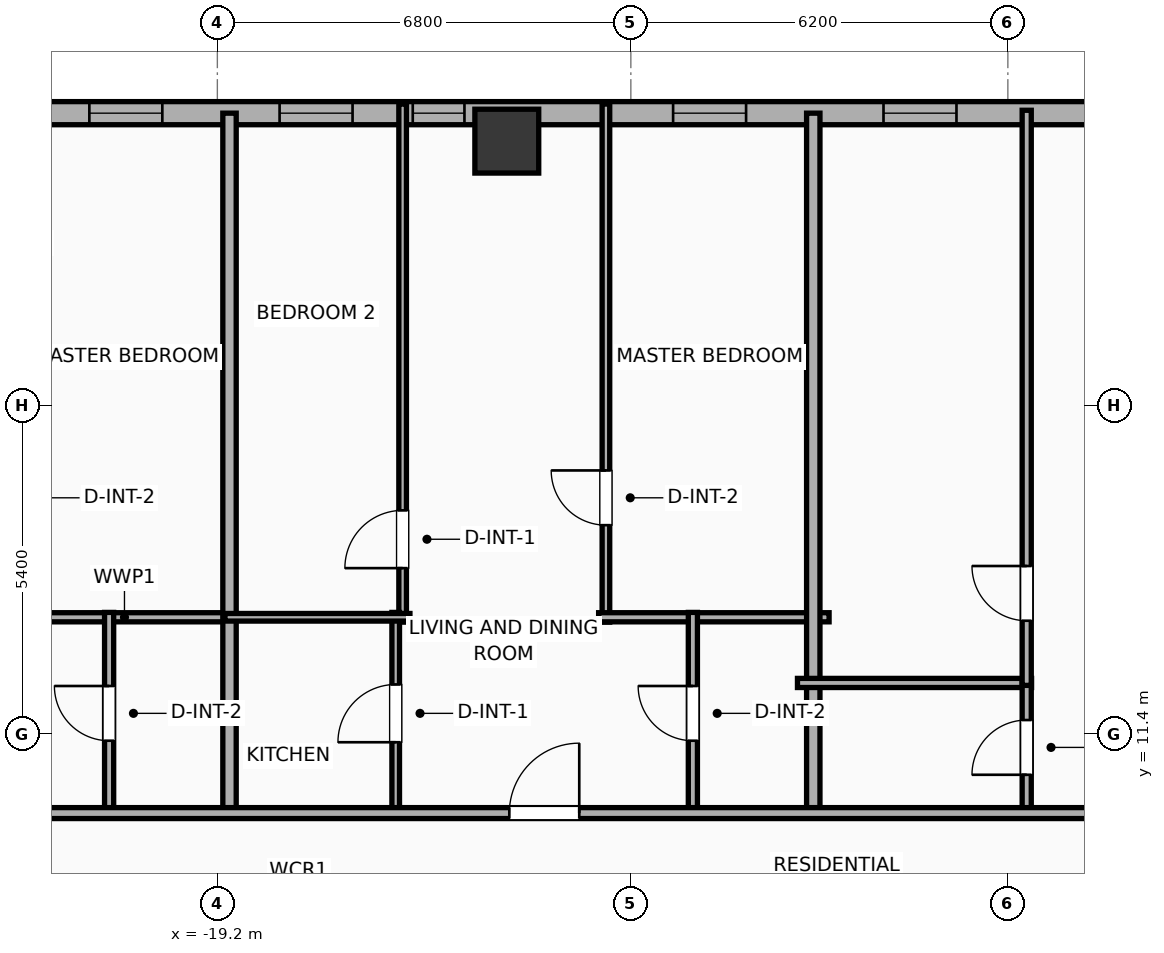
"""IFC4 building model, lengths in metres.
Left out: names, types, materials, properties, quantities, classifications, styles, units other than length and angle.
Written with IfcOpenShell. Run it as: python <this file> out.ifc"""

import sys

from ifc_helpers import new_model, si_unit, direction, frame, frame_2d, origin, origin_2d, place, context, subcontext, project, spatial, rectangle, hollow_rectangle, extrude, element, fill, save


model = new_model("IFC4")
c1 = context("Model", 3, precision=1e-05, world=origin(), true_north=direction((0.0, 1.0)))
c2 = subcontext(c1, "Body", "Model", "MODEL_VIEW")
j1 = project(units=[si_unit("LENGTHUNIT", "METRE"), si_unit("PLANEANGLEUNIT", "RADIAN")], contexts=[c1])
p1 = place(None, origin())
s1 = spatial("IfcSite", under=j1, at=p1, CompositionType="ELEMENT")
p2 = place(p1, origin())
s2 = spatial("IfcBuilding", under=s1, at=p2, CompositionType="ELEMENT")
p3 = place(p2, frame((0.0, 0.0, 101.4)))
s3 = spatial("IfcBuildingStorey", under=s2, at=p3, CompositionType="ELEMENT", Elevation=101.4)
p4 = place(p3, frame((-14.44, 21.15, 0.0), z_axis=(0.0, 0.0, 1.0), x_axis=(1.0, 0.0, 0.0)))
e1 = element("IfcColumn", 1, at=p4, inside=s3, PredefinedType="COLUMN", context=c2, shape_type="SweptSolid", body=[
    extrude(hollow_rectangle(XDim=1.05, YDim=1.05, WallThickness=0.036, at=origin_2d()), origin(), (0.0, 0.0, 1.0), 3.9),
])
p5 = place(p3, frame((-25.381, 21.61, 0.0), z_axis=(0.0, 0.0, 1.0), x_axis=(1.0, 0.0, 0.0)))
e2 = element("IfcWall", 2, at=p5, inside=s3, PredefinedType="ELEMENTEDWALL", context=c2, shape_type="SweptSolid", body=[
    extrude(rectangle(XDim=54.763, YDim=0.38, at=frame_2d((27.381, 0.0))), origin(), (0.0, 0.0, 1.0), 3.65),
])
p6 = place(p5, frame((45.067, 0.0, 0.75)))
e3 = element("IfcOpeningElement", 3, at=p6, cuts=e2, PredefinedType="OPENING", context=c2, shape_type="SweptSolid", body=[
    extrude(rectangle(XDim=2.4, YDim=2.1, at=frame_2d((1.2, 1.05))), frame((0.0, 0.2, 0.0), z_axis=(0.0, -1.0, 0.0), x_axis=(1.0, 0.0, 0.0)), (0.0, 0.0, 1.0), 0.4),
])
p7 = place(p5, frame((4.076, 0.0, 0.75)))
e4 = element("IfcOpeningElement", 4, at=p7, cuts=e2, PredefinedType="OPENING", context=c2, shape_type="SweptSolid", body=[
    extrude(rectangle(XDim=1.2, YDim=2.05, at=frame_2d((0.6, 1.025))), frame((0.0, 0.2, 0.0), z_axis=(0.0, -1.0, 0.0), x_axis=(1.0, 0.0, 0.0)), (0.0, 0.0, 1.0), 0.4),
])
p8 = place(p5, frame((9.395, 0.0, 0.75)))
e5 = element("IfcOpeningElement", 5, at=p8, cuts=e2, PredefinedType="OPENING", context=c2, shape_type="SweptSolid", body=[
    extrude(rectangle(XDim=0.85, YDim=2.05, at=frame_2d((0.425, 1.025))), frame((0.0, 0.2, 0.0), z_axis=(0.0, -1.0, 0.0), x_axis=(1.0, 0.0, 0.0)), (0.0, 0.0, 1.0), 0.4),
])
p9 = place(p5, frame((7.205, 0.0, 0.75)))
e6 = element("IfcOpeningElement", 6, at=p9, cuts=e2, PredefinedType="OPENING", context=c2, shape_type="SweptSolid", body=[
    extrude(rectangle(XDim=1.2, YDim=2.05, at=frame_2d((0.6, 1.025))), frame((0.0, 0.2, 0.0), z_axis=(0.0, -1.0, 0.0), x_axis=(1.0, 0.0, 0.0)), (0.0, 0.0, 1.0), 0.4),
])
p10 = place(p5, frame((13.676, 0.0, 0.75)))
e7 = element("IfcOpeningElement", 7, at=p10, cuts=e2, PredefinedType="OPENING", context=c2, shape_type="SweptSolid", body=[
    extrude(rectangle(XDim=1.2, YDim=2.05, at=frame_2d((0.6, 1.025))), frame((0.0, 0.2, 0.0), z_axis=(0.0, -1.0, 0.0), x_axis=(1.0, 0.0, 0.0)), (0.0, 0.0, 1.0), 0.4),
])
p11 = place(p5, frame((17.136, 0.0, 0.75)))
e8 = element("IfcOpeningElement", 8, at=p11, cuts=e2, PredefinedType="OPENING", context=c2, shape_type="SweptSolid", body=[
    extrude(rectangle(XDim=1.2, YDim=2.05, at=frame_2d((0.6, 1.025))), frame((0.0, 0.2, 0.0), z_axis=(0.0, -1.0, 0.0), x_axis=(1.0, 0.0, 0.0)), (0.0, 0.0, 1.0), 0.4),
])
p12 = place(p5, frame((22.656, 0.0, 0.75)))
e9 = element("IfcOpeningElement", 9, at=p12, cuts=e2, PredefinedType="OPENING", context=c2, shape_type="SweptSolid", body=[
    extrude(rectangle(XDim=1.2, YDim=2.05, at=frame_2d((0.6, 1.025))), frame((0.0, 0.2, 0.0), z_axis=(0.0, -1.0, 0.0), x_axis=(1.0, 0.0, 0.0)), (0.0, 0.0, 1.0), 0.4),
])
p13 = place(p5, frame((29.443, 0.0, 0.75)))
e10 = element("IfcOpeningElement", 10, at=p13, cuts=e2, PredefinedType="OPENING", context=c2, shape_type="SweptSolid", body=[
    extrude(rectangle(XDim=1.2, YDim=2.05, at=frame_2d((0.6, 1.025))), frame((0.0, 0.2, 0.0), z_axis=(0.0, -1.0, 0.0), x_axis=(1.0, 0.0, 0.0)), (0.0, 0.0, 1.0), 0.4),
])
p14 = place(p5, frame((26.348, 0.0, 0.75)))
e11 = element("IfcOpeningElement", 11, at=p14, cuts=e2, PredefinedType="OPENING", context=c2, shape_type="SweptSolid", body=[
    extrude(rectangle(XDim=1.2, YDim=2.05, at=frame_2d((0.6, 1.025))), frame((0.0, 0.2, 0.0), z_axis=(0.0, -1.0, 0.0), x_axis=(1.0, 0.0, 0.0)), (0.0, 0.0, 1.0), 0.4),
])
p15 = place(p5, frame((33.596, 0.0, 0.75)))
e12 = element("IfcOpeningElement", 12, at=p15, cuts=e2, PredefinedType="OPENING", context=c2, shape_type="SweptSolid", body=[
    extrude(rectangle(XDim=1.2, YDim=2.05, at=frame_2d((0.6, 1.025))), frame((0.0, 0.2, 0.0), z_axis=(0.0, -1.0, 0.0), x_axis=(1.0, 0.0, 0.0)), (0.0, 0.0, 1.0), 0.4),
])
p16 = place(p5, frame((36.014, 0.0, 0.75)))
e13 = element("IfcOpeningElement", 13, at=p16, cuts=e2, PredefinedType="OPENING", context=c2, shape_type="SweptSolid", body=[
    extrude(rectangle(XDim=1.2, YDim=2.05, at=frame_2d((0.6, 1.025))), frame((0.0, 0.2, 0.0), z_axis=(0.0, -1.0, 0.0), x_axis=(1.0, 0.0, 0.0)), (0.0, 0.0, 1.0), 0.4),
])
p17 = place(p5, frame((40.814, 0.0, 0.75)))
e14 = element("IfcOpeningElement", 14, at=p17, cuts=e2, PredefinedType="OPENING", context=c2, shape_type="SweptSolid", body=[
    extrude(rectangle(XDim=1.2, YDim=2.05, at=frame_2d((0.6, 1.025))), frame((0.0, 0.2, 0.0), z_axis=(0.0, -1.0, 0.0), x_axis=(1.0, 0.0, 0.0)), (0.0, 0.0, 1.0), 0.4),
])
p18 = place(p5, frame((49.385, 0.0, 0.75)))
e15 = element("IfcOpeningElement", 15, at=p18, cuts=e2, PredefinedType="OPENING", context=c2, shape_type="SweptSolid", body=[
    extrude(rectangle(XDim=1.2, YDim=2.05, at=frame_2d((0.6, 1.025))), frame((0.0, 0.2, 0.0), z_axis=(0.0, -1.0, 0.0), x_axis=(1.0, 0.0, 0.0)), (0.0, 0.0, 1.0), 0.4),
])
p19 = place(p5, frame((52.181, 0.0, 0.75)))
e16 = element("IfcOpeningElement", 16, at=p19, cuts=e2, PredefinedType="OPENING", context=c2, shape_type="SweptSolid", body=[
    extrude(rectangle(XDim=1.2, YDim=2.05, at=frame_2d((0.6, 1.025))), frame((0.0, 0.2, 0.0), z_axis=(0.0, -1.0, 0.0), x_axis=(1.0, 0.0, 0.0)), (0.0, 0.0, 1.0), 0.4),
])
p20 = place(p3, frame((-22.53, 13.32, 0.0), z_axis=(0.0, 0.0, 1.0), x_axis=(1.0, 0.0, 0.0)))
e17 = element("IfcWall", 17, at=p20, inside=s3, PredefinedType="PLUMBINGWALL", context=c2, shape_type="SweptSolid", body=[
    extrude(rectangle(XDim=3.605, YDim=0.15, at=frame_2d((1.802, 0.0))), origin(), (0.0, 0.0, 1.0), 3.65),
])
p21 = place(p3, frame((-20.98, 10.08, 0.0), z_axis=(0.0, 0.0, 1.0), x_axis=(0.0, 1.0, 0.0)))
e18 = element("IfcWall", 18, at=p21, inside=s3, PredefinedType="PLUMBINGWALL", context=c2, shape_type="SweptSolid", body=[
    extrude(rectangle(XDim=3.32, YDim=0.15, at=frame_2d((1.66, 0.0))), origin(), (0.0, 0.0, 1.0), 3.65),
])
p22 = place(p21, frame((1.21, 0.0, 0.0)))
e19 = element("IfcOpeningElement", 19, at=p22, cuts=e18, PredefinedType="OPENING", context=c2, shape_type="SweptSolid", body=[
    extrude(rectangle(XDim=0.9, YDim=2.05, at=frame_2d((0.45, 1.025))), frame((0.0, 0.085, 0.0), z_axis=(0.0, -1.0, 0.0), x_axis=(1.0, 0.0, 0.0)), (0.0, 0.0, 1.0), 0.17),
])
p23 = place(p3, frame((-19.0, 10.02, 0.0), z_axis=(0.0, 0.0, 1.0), x_axis=(0.0, 1.0, 0.0)))
e20 = element("IfcWall", 20, at=p23, inside=s3, PredefinedType="PARTITIONING", context=c2, shape_type="SweptSolid", body=[
    extrude(rectangle(XDim=11.59, YDim=0.22, at=frame_2d((5.795, 0.0))), origin(), (0.0, 0.0, 1.0), 3.65),
])
p24 = place(p3, frame((-16.153, 13.24, 0.0), z_axis=(0.0, 0.0, 1.0), x_axis=(0.0, 1.0, 0.0)))
e21 = element("IfcWall", 21, at=p24, inside=s3, PredefinedType="PARTITIONING", context=c2, shape_type="SweptSolid", body=[
    extrude(rectangle(XDim=8.52, YDim=0.125, at=frame_2d((4.26, 0.0))), origin(), (0.0, 0.0, 1.0), 3.65),
])
p25 = place(p24, frame((0.888, 0.0, 0.0)))
e22 = element("IfcOpeningElement", 22, at=p25, cuts=e21, PredefinedType="OPENING", context=c2, shape_type="SweptSolid", body=[
    extrude(rectangle(XDim=0.95, YDim=2.05, at=frame_2d((0.475, 1.025))), frame((0.0, 0.073, 0.0), z_axis=(0.0, -1.0, 0.0), x_axis=(1.0, 0.0, 0.0)), (0.0, 0.0, 1.0), 0.145),
])
p26 = place(p3, frame((-12.81, 13.24, 0.0), z_axis=(0.0, 0.0, 1.0), x_axis=(0.0, 1.0, 0.0)))
e23 = element("IfcWall", 23, at=p26, inside=s3, PredefinedType="PARTITIONING", context=c2, shape_type="SweptSolid", body=[
    extrude(rectangle(XDim=8.52, YDim=0.125, at=frame_2d((4.26, 0.0))), origin(), (0.0, 0.0, 1.0), 3.65),
])
p27 = place(p26, frame((1.595, 0.0, 0.0)))
e24 = element("IfcOpeningElement", 24, at=p27, cuts=e23, PredefinedType="OPENING", context=c2, shape_type="SweptSolid", body=[
    extrude(rectangle(XDim=0.9, YDim=2.05, at=frame_2d((0.45, 1.025))), frame((0.0, 0.073, 0.0), z_axis=(0.0, -1.0, 0.0), x_axis=(1.0, 0.0, 0.0)), (0.0, 0.0, 1.0), 0.145),
])
p28 = place(p3, frame((-12.93, 13.32, 0.0), z_axis=(0.0, 0.0, 1.0), x_axis=(1.0, 0.0, 0.0)))
e25 = element("IfcWall", 25, at=p28, inside=s3, PredefinedType="PLUMBINGWALL", context=c2, shape_type="SweptSolid", body=[
    extrude(rectangle(XDim=3.79, YDim=0.15, at=frame_2d((1.895, 0.0))), origin(), (0.0, 0.0, 1.0), 3.65),
])
p29 = place(p3, frame((-16.267, 10.08, 0.0), z_axis=(0.0, 0.0, 1.0), x_axis=(0.0, 1.0, 0.0)))
e26 = element("IfcWall", 26, at=p29, inside=s3, PredefinedType="PARTITIONING", context=c2, shape_type="SweptSolid", body=[
    extrude(rectangle(XDim=3.32, YDim=0.125, at=frame_2d((1.66, 0.0))), origin(), (0.0, 0.0, 1.0), 3.65),
])
p30 = place(p29, frame((1.185, 0.0, 0.0)))
e27 = element("IfcOpeningElement", 27, at=p30, cuts=e26, PredefinedType="OPENING", context=c2, shape_type="SweptSolid", body=[
    extrude(rectangle(XDim=0.95, YDim=2.05, at=frame_2d((0.475, 1.025))), frame((0.0, 0.073, 0.0), z_axis=(0.0, -1.0, 0.0), x_axis=(1.0, 0.0, 0.0)), (0.0, 0.0, 1.0), 0.145),
])
p31 = place(p3, frame((-19.075, 13.32, 0.0), z_axis=(0.0, 0.0, 1.0), x_axis=(1.0, 0.0, 0.0)))
e28 = element("IfcWall", 28, at=p31, inside=s3, PredefinedType="PARTITIONING", context=c2, shape_type="SweptSolid", body=[
    extrude(rectangle(XDim=3.042, YDim=0.125, at=frame_2d((1.521, 0.0))), origin(), (0.0, 0.0, 1.0), 3.65),
])
p32 = place(p3, frame((-11.38, 10.08, 0.0), z_axis=(0.0, 0.0, 1.0), x_axis=(0.0, 1.0, 0.0)))
e29 = element("IfcWall", 29, at=p32, inside=s3, PredefinedType="PLUMBINGWALL", context=c2, shape_type="SweptSolid", body=[
    extrude(rectangle(XDim=3.32, YDim=0.15, at=frame_2d((1.66, 0.0))), origin(), (0.0, 0.0, 1.0), 3.65),
])
p33 = place(p32, frame((1.21, 0.0, 0.0)))
e30 = element("IfcOpeningElement", 30, at=p33, cuts=e29, PredefinedType="OPENING", context=c2, shape_type="SweptSolid", body=[
    extrude(rectangle(XDim=0.9, YDim=2.05, at=frame_2d((0.45, 1.025))), frame((0.0, 0.085, 0.0), z_axis=(0.0, -1.0, 0.0), x_axis=(1.0, 0.0, 0.0)), (0.0, 0.0, 1.0), 0.17),
])
p34 = place(p3, frame((-9.4, 10.02, 0.0), z_axis=(0.0, 0.0, 1.0), x_axis=(0.0, 1.0, 0.0)))
e31 = element("IfcWall", 31, at=p34, inside=s3, PredefinedType="PARTITIONING", context=c2, shape_type="SweptSolid", body=[
    extrude(rectangle(XDim=11.59, YDim=0.22, at=frame_2d((5.795, 0.0))), origin(), (0.0, 0.0, 1.0), 3.65),
])
p35 = place(p3, frame((-9.66, 12.24, 0.0), z_axis=(0.0, 0.0, 1.0), x_axis=(1.0, 0.0, 0.0)))
e32 = element("IfcWall", 32, at=p35, inside=s3, PredefinedType="PLUMBINGWALL", context=c2, shape_type="SweptSolid", body=[
    extrude(rectangle(XDim=3.85, YDim=0.15, at=frame_2d((1.925, 0.0))), origin(), (0.0, 0.0, 1.0), 3.65),
])
p36 = place(p3, frame((-5.89, 10.08, 0.0), z_axis=(0.0, 0.0, 1.0), x_axis=(0.0, 1.0, 0.0)))
e33 = element("IfcWall", 33, at=p36, inside=s3, PredefinedType="PLUMBINGWALL", context=c2, shape_type="SweptSolid", body=[
    extrude(rectangle(XDim=2.2, YDim=0.15, at=frame_2d((1.1, 0.0))), origin(), (0.0, 0.0, 1.0), 3.65),
])
p37 = place(p36, frame((0.65, 0.0, 0.0)))
e34 = element("IfcOpeningElement", 34, at=p37, cuts=e33, PredefinedType="OPENING", context=c2, shape_type="SweptSolid", body=[
    extrude(rectangle(XDim=0.9, YDim=2.05, at=frame_2d((0.45, 1.025))), frame((0.0, 0.085, 0.0), z_axis=(0.0, -1.0, 0.0), x_axis=(1.0, 0.0, 0.0)), (0.0, 0.0, 1.0), 0.17),
])
p38 = place(p3, frame((-5.89, 12.2, 0.0), z_axis=(0.0, 0.0, 1.0), x_axis=(0.0, 1.0, 0.0)))
e35 = element("IfcWall", 35, at=p38, inside=s3, PredefinedType="PLUMBINGWALL", context=c2, shape_type="SweptSolid", body=[
    extrude(rectangle(XDim=9.458, YDim=0.15, at=frame_2d((4.729, 0.0))), origin(), (0.0, 0.0, 1.0), 3.65),
])
p39 = place(p38, frame((1.063, 0.0, 0.0)))
e36 = element("IfcOpeningElement", 36, at=p39, cuts=e35, PredefinedType="OPENING", context=c2, shape_type="SweptSolid", body=[
    extrude(rectangle(XDim=0.9, YDim=2.05, at=frame_2d((0.45, 1.025))), frame((0.0, 0.085, 0.0), z_axis=(0.0, -1.0, 0.0), x_axis=(1.0, 0.0, 0.0)), (0.0, 0.0, 1.0), 0.17),
])
p40 = place(p3, frame((-29.21, 10.1, 0.0), z_axis=(0.0, 0.0, 1.0), x_axis=(1.0, 0.0, 0.0)))
e37 = element("IfcWall", 37, at=p40, inside=s3, PredefinedType="PARTITIONING", context=c2, shape_type="SweptSolid", body=[
    extrude(rectangle(XDim=62.42, YDim=0.18, at=frame_2d((31.21, 0.0))), origin(), (0.0, 0.0, 1.0), 3.65),
])
p41 = place(p40, frame((4.906, 0.0, 0.0)))
e38 = element("IfcOpeningElement", 38, at=p41, cuts=e37, PredefinedType="OPENING", context=c2, shape_type="SweptSolid", body=[
    extrude(rectangle(XDim=1.15, YDim=2.05, at=frame_2d((0.575, 1.025))), frame((0.0, 0.1, 0.0), z_axis=(0.0, -1.0, 0.0), x_axis=(1.0, 0.0, 0.0)), (0.0, 0.0, 1.0), 0.2),
])
p42 = place(p40, frame((14.812, 0.0, 0.0)))
e39 = element("IfcOpeningElement", 39, at=p42, cuts=e37, PredefinedType="OPENING", context=c2, shape_type="SweptSolid", body=[
    extrude(rectangle(XDim=1.15, YDim=2.05, at=frame_2d((0.575, 1.025))), frame((0.0, 0.1, 0.0), z_axis=(0.0, -1.0, 0.0), x_axis=(1.0, 0.0, 0.0)), (0.0, 0.0, 1.0), 0.2),
])
p43 = place(p40, frame((24.406, 0.0, 0.0)))
e40 = element("IfcOpeningElement", 40, at=p43, cuts=e37, PredefinedType="OPENING", context=c2, shape_type="SweptSolid", body=[
    extrude(rectangle(XDim=1.15, YDim=2.05, at=frame_2d((0.575, 1.025))), frame((0.0, 0.1, 0.0), z_axis=(0.0, -1.0, 0.0), x_axis=(1.0, 0.0, 0.0)), (0.0, 0.0, 1.0), 0.2),
])
p44 = place(p40, frame((33.981, 0.0, 0.0)))
e41 = element("IfcOpeningElement", 41, at=p44, cuts=e37, PredefinedType="OPENING", context=c2, shape_type="SweptSolid", body=[
    extrude(rectangle(XDim=1.15, YDim=2.05, at=frame_2d((0.575, 1.025))), frame((0.0, 0.1, 0.0), z_axis=(0.0, -1.0, 0.0), x_axis=(1.0, 0.0, 0.0)), (0.0, 0.0, 1.0), 0.2),
])
p45 = place(p40, frame((43.138, 0.0, 0.0)))
e42 = element("IfcOpeningElement", 42, at=p45, cuts=e37, PredefinedType="OPENING", context=c2, shape_type="SweptSolid", body=[
    extrude(rectangle(XDim=1.15, YDim=2.05, at=frame_2d((0.575, 1.025))), frame((0.0, 0.1, 0.0), z_axis=(0.0, -1.0, 0.0), x_axis=(1.0, 0.0, 0.0)), (0.0, 0.0, 1.0), 0.2),
])
p46 = place(p40, frame((51.777, 0.0, 0.0)))
e43 = element("IfcOpeningElement", 43, at=p46, cuts=e37, PredefinedType="OPENING", context=c2, shape_type="SweptSolid", body=[
    extrude(rectangle(XDim=0.9, YDim=2.05, at=frame_2d((0.45, 1.025))), frame((0.0, 0.1, 0.0), z_axis=(0.0, -1.0, 0.0), x_axis=(1.0, 0.0, 0.0)), (0.0, 0.0, 1.0), 0.2),
])
p47 = place(p40, frame((58.718, 0.0, 0.0)))
e44 = element("IfcOpeningElement", 44, at=p47, cuts=e37, PredefinedType="OPENING", context=c2, shape_type="SweptSolid", body=[
    extrude(rectangle(XDim=0.9, YDim=2.05, at=frame_2d((0.45, 1.025))), frame((0.0, 0.1, 0.0), z_axis=(0.0, -1.0, 0.0), x_axis=(1.0, 0.0, 0.0)), (0.0, 0.0, 1.0), 0.2),
])
p48 = place(p7, origin())
e45 = element("IfcWindow", 45, at=p48, inside=s3, PartitioningType="SINGLE_PANEL", PredefinedType="WINDOW", context=c2, shape_type="SweptSolid", body=[
    extrude(rectangle(XDim=1.2, YDim=2.05, at=frame_2d((0.6, 1.025))), frame((0.0, 0.03, 0.0), z_axis=(0.0, -1.0, 0.0), x_axis=(1.0, 0.0, 0.0)), (0.0, 0.0, 1.0), 0.06),
])
fill(e4, e45)
p49 = place(p8, origin())
e46 = element("IfcWindow", 46, at=p49, inside=s3, PartitioningType="SINGLE_PANEL", PredefinedType="WINDOW", context=c2, shape_type="SweptSolid", body=[
    extrude(rectangle(XDim=0.85, YDim=2.05, at=frame_2d((0.425, 1.025))), frame((0.0, 0.03, 0.0), z_axis=(0.0, -1.0, 0.0), x_axis=(1.0, 0.0, 0.0)), (0.0, 0.0, 1.0), 0.06),
])
fill(e5, e46)
p50 = place(p9, origin())
e47 = element("IfcWindow", 47, at=p50, inside=s3, PartitioningType="SINGLE_PANEL", PredefinedType="WINDOW", context=c2, shape_type="SweptSolid", body=[
    extrude(rectangle(XDim=1.2, YDim=2.05, at=frame_2d((0.6, 1.025))), frame((0.0, 0.03, 0.0), z_axis=(0.0, -1.0, 0.0), x_axis=(1.0, 0.0, 0.0)), (0.0, 0.0, 1.0), 0.06),
])
fill(e6, e47)
p51 = place(p10, origin())
e48 = element("IfcWindow", 48, at=p51, inside=s3, PartitioningType="SINGLE_PANEL", PredefinedType="WINDOW", context=c2, shape_type="SweptSolid", body=[
    extrude(rectangle(XDim=1.2, YDim=2.05, at=frame_2d((0.6, 1.025))), frame((0.0, 0.03, 0.0), z_axis=(0.0, -1.0, 0.0), x_axis=(1.0, 0.0, 0.0)), (0.0, 0.0, 1.0), 0.06),
])
fill(e7, e48)
p52 = place(p11, origin())
e49 = element("IfcWindow", 49, at=p52, inside=s3, PartitioningType="SINGLE_PANEL", PredefinedType="WINDOW", context=c2, shape_type="SweptSolid", body=[
    extrude(rectangle(XDim=1.2, YDim=2.05, at=frame_2d((0.6, 1.025))), frame((0.0, 0.03, 0.0), z_axis=(0.0, -1.0, 0.0), x_axis=(1.0, 0.0, 0.0)), (0.0, 0.0, 1.0), 0.06),
])
fill(e8, e49)
p53 = place(p22, origin())
e50 = element("IfcDoor", 50, at=p53, inside=s3, OperationType="SINGLE_SWING_RIGHT", PredefinedType="DOOR", context=c2, shape_type="SweptSolid", body=[
    extrude(rectangle(XDim=0.9, YDim=2.05, at=frame_2d((0.45, 1.025))), frame((0.0, 0.025, 0.0), z_axis=(0.0, -1.0, 0.0), x_axis=(1.0, 0.0, 0.0)), (0.0, 0.0, 1.0), 0.05),
])
fill(e19, e50)
p54 = place(p25, origin())
e51 = element("IfcDoor", 51, at=p54, inside=s3, OperationType="SINGLE_SWING_LEFT", PredefinedType="DOOR", context=c2, shape_type="SweptSolid", body=[
    extrude(rectangle(XDim=0.95, YDim=2.05, at=frame_2d((0.475, 1.025))), frame((0.0, 0.025, 0.0), z_axis=(0.0, -1.0, 0.0), x_axis=(1.0, 0.0, 0.0)), (0.0, 0.0, 1.0), 0.05),
])
fill(e22, e51)
p55 = place(p27, origin())
e52 = element("IfcDoor", 52, at=p55, inside=s3, OperationType="SINGLE_SWING_RIGHT", PredefinedType="DOOR", context=c2, shape_type="SweptSolid", body=[
    extrude(rectangle(XDim=0.9, YDim=2.05, at=frame_2d((0.45, 1.025))), frame((0.0, 0.025, 0.0), z_axis=(0.0, -1.0, 0.0), x_axis=(1.0, 0.0, 0.0)), (0.0, 0.0, 1.0), 0.05),
])
fill(e24, e52)
p56 = place(p30, origin())
e53 = element("IfcDoor", 53, at=p56, inside=s3, OperationType="SINGLE_SWING_LEFT", PredefinedType="DOOR", context=c2, shape_type="SweptSolid", body=[
    extrude(rectangle(XDim=0.95, YDim=2.05, at=frame_2d((0.475, 1.025))), frame((0.0, 0.025, 0.0), z_axis=(0.0, -1.0, 0.0), x_axis=(1.0, 0.0, 0.0)), (0.0, 0.0, 1.0), 0.05),
])
fill(e27, e53)
p57 = place(p33, origin())
e54 = element("IfcDoor", 54, at=p57, inside=s3, OperationType="SINGLE_SWING_RIGHT", PredefinedType="DOOR", context=c2, shape_type="SweptSolid", body=[
    extrude(rectangle(XDim=0.9, YDim=2.05, at=frame_2d((0.45, 1.025))), frame((0.0, 0.025, 0.0), z_axis=(0.0, -1.0, 0.0), x_axis=(1.0, 0.0, 0.0)), (0.0, 0.0, 1.0), 0.05),
])
fill(e30, e54)
p58 = place(p37, origin())
e55 = element("IfcDoor", 55, at=p58, inside=s3, OperationType="SINGLE_SWING_LEFT", PredefinedType="DOOR", context=c2, shape_type="SweptSolid", body=[
    extrude(rectangle(XDim=0.9, YDim=2.05, at=frame_2d((0.45, 1.025))), frame((0.0, 0.025, 0.0), z_axis=(0.0, -1.0, 0.0), x_axis=(1.0, 0.0, 0.0)), (0.0, 0.0, 1.0), 0.05),
])
fill(e34, e55)
p59 = place(p39, origin())
e56 = element("IfcDoor", 56, at=p59, inside=s3, OperationType="SINGLE_SWING_RIGHT", PredefinedType="DOOR", context=c2, shape_type="SweptSolid", body=[
    extrude(rectangle(XDim=0.9, YDim=2.05, at=frame_2d((0.45, 1.025))), frame((0.0, 0.025, 0.0), z_axis=(0.0, -1.0, 0.0), x_axis=(1.0, 0.0, 0.0)), (0.0, 0.0, 1.0), 0.05),
])
fill(e36, e56)
p60 = place(p42, origin())
e57 = element("IfcDoor", 57, at=p60, inside=s3, OperationType="SINGLE_SWING_RIGHT", PredefinedType="DOOR", context=c2, shape_type="SweptSolid", body=[
    extrude(rectangle(XDim=1.15, YDim=2.05, at=frame_2d((0.575, 1.025))), frame((0.0, 0.025, 0.0), z_axis=(0.0, -1.0, 0.0), x_axis=(1.0, 0.0, 0.0)), (0.0, 0.0, 1.0), 0.05),
])
fill(e39, e57)
save(model, sys.argv[1])
